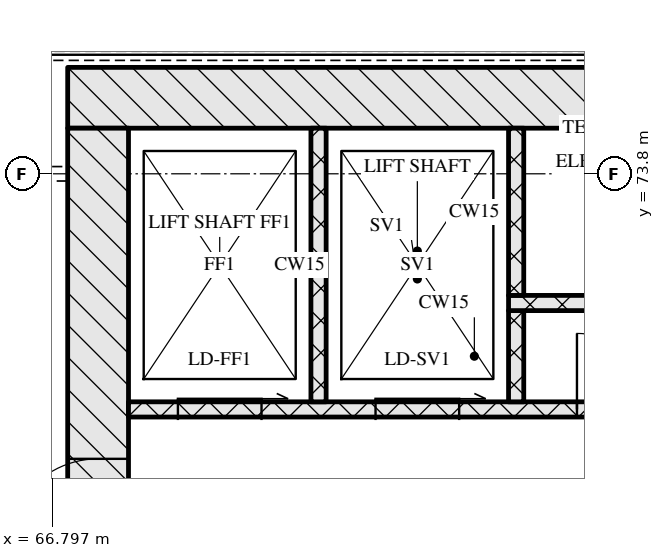
"""IFC4 building model, lengths in metres.
Left out: names, types, materials, properties, quantities, classifications, styles, units other than length and angle.
Written with IfcOpenShell. Run it as: python <this file> out.ifc"""

import sys

from ifc_helpers import new_model, si_unit, direction, frame, frame_2d, origin, place, context, subcontext, project, spatial, rectangle, extrude, element, fill, save


model = new_model("IFC4")
c1 = context("Model", 3, precision=1e-05, world=origin(), true_north=direction((0.0, 1.0)))
c2 = subcontext(c1, "Body", "Model", "MODEL_VIEW")
j1 = project(units=[si_unit("LENGTHUNIT", "METRE"), si_unit("PLANEANGLEUNIT", "RADIAN")], contexts=[c1])
p1 = place(None, origin())
s1 = spatial("IfcSite", under=j1, at=p1, CompositionType="ELEMENT")
p2 = place(p1, origin())
s2 = spatial("IfcBuilding", under=s1, at=p2, CompositionType="ELEMENT")
p3 = place(p2, frame((0.0, 0.0, 165.45)))
s3 = spatial("IfcBuildingStorey", under=s2, at=p3, CompositionType="ELEMENT", Elevation=165.45)
p4 = place(p3, frame((67.0, 74.8, 0.0), z_axis=(0.0, 0.0, 1.0), x_axis=(1.0, 0.0, 0.0)))
e1 = element("IfcWall", 1, at=p4, inside=s3, PredefinedType="SOLIDWALL", context=c2, shape_type="SweptSolid", body=[
    extrude(rectangle(XDim=41.2, YDim=0.8, at=frame_2d((20.6, 0.0))), origin(), (0.0, 0.0, 1.0), 3.32),
])
p5 = place(p3, frame((67.4, 62.4, 0.0), z_axis=(0.0, 0.0, 1.0), x_axis=(0.0, 1.0, 0.0)))
e2 = element("IfcWall", 2, at=p5, inside=s3, PredefinedType="SOLIDWALL", context=c2, shape_type="SweptSolid", body=[
    extrude(rectangle(XDim=12.0, YDim=0.8, at=frame_2d((6.0, 0.0))), origin(), (0.0, 0.0, 1.0), 3.32),
])
p6 = place(p5, frame((6.45, 0.0, 0.0)))
e3 = element("IfcOpeningElement", 3, at=p6, cuts=e2, PredefinedType="OPENING", context=c2, shape_type="SweptSolid", body=[
    extrude(rectangle(XDim=1.2, YDim=2.1, at=frame_2d((0.6, 1.05))), frame((0.0, 0.41, 0.0), z_axis=(0.0, -1.0, 0.0), x_axis=(1.0, 0.0, 0.0)), (0.0, 0.0, 1.0), 0.82),
])
p7 = place(p3, frame((67.8, 70.7, 0.0), z_axis=(0.0, 0.0, 1.0), x_axis=(1.0, 0.0, 0.0)))
e4 = element("IfcWall", 4, at=p7, inside=s3, PredefinedType="SOLIDWALL", context=c2, shape_type="SweptSolid", body=[
    extrude(rectangle(XDim=39.6, YDim=0.2, at=frame_2d((19.8, 0.0))), origin(), (0.0, 0.0, 1.0), 3.32),
])
p8 = place(p7, frame((0.65, 0.0, 0.0)))
e5 = element("IfcOpeningElement", 5, at=p8, cuts=e4, PredefinedType="OPENING", context=c2, shape_type="SweptSolid", body=[
    extrude(rectangle(XDim=1.1, YDim=2.1, at=frame_2d((0.55, 1.05))), frame((0.0, 0.11, 0.0), z_axis=(0.0, -1.0, 0.0), x_axis=(1.0, 0.0, 0.0)), (0.0, 0.0, 1.0), 0.22),
])
p9 = place(p7, frame((3.25, 0.0, 0.0)))
e6 = element("IfcOpeningElement", 6, at=p9, cuts=e4, PredefinedType="OPENING", context=c2, shape_type="SweptSolid", body=[
    extrude(rectangle(XDim=1.1, YDim=2.1, at=frame_2d((0.55, 1.05))), frame((0.0, 0.11, 0.0), z_axis=(0.0, -1.0, 0.0), x_axis=(1.0, 0.0, 0.0)), (0.0, 0.0, 1.0), 0.22),
])
p10 = place(p7, frame((5.9, 0.0, 0.0)))
e7 = element("IfcOpeningElement", 7, at=p10, cuts=e4, PredefinedType="OPENING", context=c2, shape_type="SweptSolid", body=[
    extrude(rectangle(XDim=1.0, YDim=2.1, at=frame_2d((0.5, 1.05))), frame((0.0, 0.11, 0.0), z_axis=(0.0, -1.0, 0.0), x_axis=(1.0, 0.0, 0.0)), (0.0, 0.0, 1.0), 0.22),
])
p11 = place(p7, frame((21.7, 0.0, 0.0)))
e8 = element("IfcOpeningElement", 8, at=p11, cuts=e4, PredefinedType="OPENING", context=c2, shape_type="SweptSolid", body=[
    extrude(rectangle(XDim=1.0, YDim=2.1, at=frame_2d((0.5, 1.05))), frame((0.0, 0.11, 0.0), z_axis=(0.0, -1.0, 0.0), x_axis=(1.0, 0.0, 0.0)), (0.0, 0.0, 1.0), 0.22),
])
p12 = place(p7, frame((32.7, 0.0, 0.0)))
e9 = element("IfcOpeningElement", 9, at=p12, cuts=e4, PredefinedType="OPENING", context=c2, shape_type="SweptSolid", body=[
    extrude(rectangle(XDim=1.0, YDim=2.1, at=frame_2d((0.5, 1.05))), frame((0.0, 0.11, 0.0), z_axis=(0.0, -1.0, 0.0), x_axis=(1.0, 0.0, 0.0)), (0.0, 0.0, 1.0), 0.22),
])
p13 = place(p7, frame((35.25, 0.0, 0.0)))
e10 = element("IfcOpeningElement", 10, at=p13, cuts=e4, PredefinedType="OPENING", context=c2, shape_type="SweptSolid", body=[
    extrude(rectangle(XDim=1.1, YDim=2.1, at=frame_2d((0.55, 1.05))), frame((0.0, 0.11, 0.0), z_axis=(0.0, -1.0, 0.0), x_axis=(1.0, 0.0, 0.0)), (0.0, 0.0, 1.0), 0.22),
])
p14 = place(p7, frame((37.85, 0.0, 0.0)))
e11 = element("IfcOpeningElement", 11, at=p14, cuts=e4, PredefinedType="OPENING", context=c2, shape_type="SweptSolid", body=[
    extrude(rectangle(XDim=1.1, YDim=2.1, at=frame_2d((0.55, 1.05))), frame((0.0, 0.11, 0.0), z_axis=(0.0, -1.0, 0.0), x_axis=(1.0, 0.0, 0.0)), (0.0, 0.0, 1.0), 0.22),
])
p15 = place(p3, frame((70.3, 70.8, 0.0), z_axis=(0.0, 0.0, 1.0), x_axis=(0.0, 1.0, 0.0)))
e12 = element("IfcWall", 12, at=p15, inside=s3, PredefinedType="SOLIDWALL", context=c2, shape_type="SweptSolid", body=[
    extrude(rectangle(XDim=3.6, YDim=0.2, at=frame_2d((1.8, 0.0))), origin(), (0.0, 0.0, 1.0), 3.32),
])
p16 = place(p3, frame((72.9, 70.8, 0.0), z_axis=(0.0, 0.0, 1.0), x_axis=(0.0, 1.0, 0.0)))
e13 = element("IfcWall", 13, at=p16, inside=s3, PredefinedType="SOLIDWALL", context=c2, shape_type="SweptSolid", body=[
    extrude(rectangle(XDim=1.2, YDim=0.2, at=frame_2d((0.6, 0.0))), origin(), (0.0, 0.0, 1.0), 3.32),
])
p17 = place(p3, frame((72.8, 72.1, 0.0), z_axis=(0.0, 0.0, 1.0), x_axis=(1.0, 0.0, 0.0)))
e14 = element("IfcWall", 14, at=p17, inside=s3, PredefinedType="SOLIDWALL", context=c2, shape_type="SweptSolid", body=[
    extrude(rectangle(XDim=11.0, YDim=0.2, at=frame_2d((5.5, 0.0))), origin(), (0.0, 0.0, 1.0), 3.32),
])
p18 = place(p17, frame((1.25, 0.0, 0.0)))
e15 = element("IfcOpeningElement", 15, at=p18, cuts=e14, PredefinedType="OPENING", context=c2, shape_type="SweptSolid", body=[
    extrude(rectangle(XDim=0.9, YDim=2.1, at=frame_2d((0.45, 1.05))), frame((0.0, 0.11, 0.0), z_axis=(0.0, -1.0, 0.0), x_axis=(1.0, 0.0, 0.0)), (0.0, 0.0, 1.0), 0.22),
])
p19 = place(p17, frame((4.65, 0.0, 0.0)))
e16 = element("IfcOpeningElement", 16, at=p19, cuts=e14, PredefinedType="OPENING", context=c2, shape_type="SweptSolid", body=[
    extrude(rectangle(XDim=0.9, YDim=2.1, at=frame_2d((0.45, 1.05))), frame((0.0, 0.11, 0.0), z_axis=(0.0, -1.0, 0.0), x_axis=(1.0, 0.0, 0.0)), (0.0, 0.0, 1.0), 0.22),
])
p20 = place(p17, frame((7.47, 0.0, 0.0)))
e17 = element("IfcOpeningElement", 17, at=p20, cuts=e14, PredefinedType="OPENING", context=c2, shape_type="SweptSolid", body=[
    extrude(rectangle(XDim=0.9, YDim=2.1, at=frame_2d((0.45, 1.05))), frame((0.0, 0.11, 0.0), z_axis=(0.0, -1.0, 0.0), x_axis=(1.0, 0.0, 0.0)), (0.0, 0.0, 1.0), 0.22),
])
p21 = place(p17, frame((9.445, 0.0, 0.0)))
e18 = element("IfcOpeningElement", 18, at=p21, cuts=e14, PredefinedType="OPENING", context=c2, shape_type="SweptSolid", body=[
    extrude(rectangle(XDim=0.9, YDim=2.1, at=frame_2d((0.45, 1.05))), frame((0.0, 0.11, 0.0), z_axis=(0.0, -1.0, 0.0), x_axis=(1.0, 0.0, 0.0)), (0.0, 0.0, 1.0), 0.22),
])
p22 = place(p3, frame((72.9, 72.2, 0.0), z_axis=(0.0, 0.0, 1.0), x_axis=(0.0, 1.0, 0.0)))
e19 = element("IfcWall", 19, at=p22, inside=s3, PredefinedType="SOLIDWALL", context=c2, shape_type="SweptSolid", body=[
    extrude(rectangle(XDim=2.2, YDim=0.2, at=frame_2d((1.1, 0.0))), origin(), (0.0, 0.0, 1.0), 3.32),
])
p23 = place(p6, origin())
e20 = element("IfcDoor", 20, at=p23, inside=s3, OperationType="SINGLE_SWING_LEFT", PredefinedType="DOOR", context=c2, shape_type="SweptSolid", body=[
    extrude(rectangle(XDim=1.2, YDim=2.1, at=frame_2d((0.6, 1.05))), frame((0.0, 0.025, 0.0), z_axis=(0.0, -1.0, 0.0), x_axis=(1.0, 0.0, 0.0)), (0.0, 0.0, 1.0), 0.05),
])
fill(e3, e20)
p24 = place(p8, origin())
e21 = element("IfcDoor", 21, at=p24, inside=s3, OperationType="SLIDING_TO_RIGHT", PredefinedType="DOOR", context=c2, shape_type="SweptSolid", body=[
    extrude(rectangle(XDim=1.1, YDim=2.1, at=frame_2d((0.55, 1.05))), frame((0.0, 0.025, 0.0), z_axis=(0.0, -1.0, 0.0), x_axis=(1.0, 0.0, 0.0)), (0.0, 0.0, 1.0), 0.05),
])
fill(e5, e21)
p25 = place(p9, origin())
e22 = element("IfcDoor", 22, at=p25, inside=s3, OperationType="SLIDING_TO_RIGHT", PredefinedType="DOOR", context=c2, shape_type="SweptSolid", body=[
    extrude(rectangle(XDim=1.1, YDim=2.1, at=frame_2d((0.55, 1.05))), frame((0.0, 0.025, 0.0), z_axis=(0.0, -1.0, 0.0), x_axis=(1.0, 0.0, 0.0)), (0.0, 0.0, 1.0), 0.05),
])
fill(e6, e22)
p26 = place(p10, origin())
e23 = element("IfcDoor", 23, at=p26, inside=s3, OperationType="SINGLE_SWING_LEFT", PredefinedType="DOOR", context=c2, shape_type="SweptSolid", body=[
    extrude(rectangle(XDim=1.0, YDim=2.1, at=frame_2d((0.5, 1.05))), frame((0.0, 0.025, 0.0), z_axis=(0.0, -1.0, 0.0), x_axis=(1.0, 0.0, 0.0)), (0.0, 0.0, 1.0), 0.05),
])
fill(e7, e23)
save(model, sys.argv[1])
